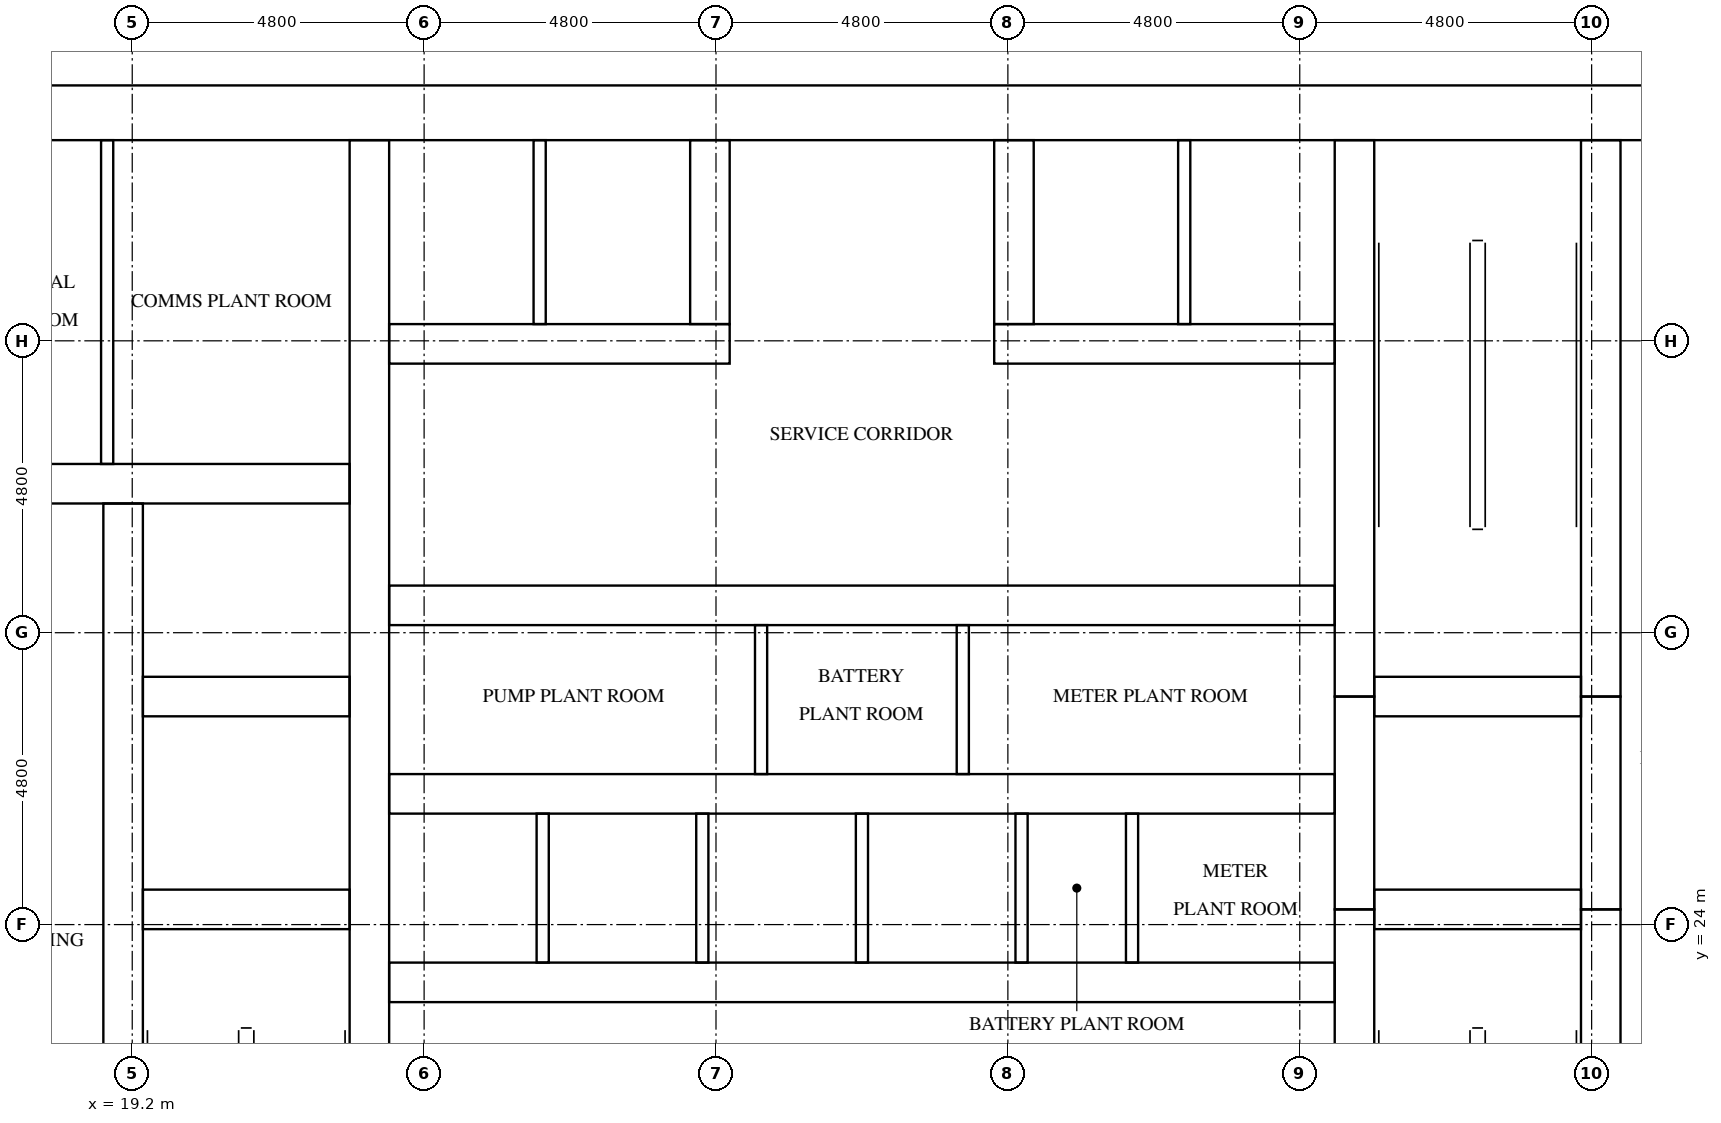
"""IFC4 building model, lengths in metres.
Left out: names, types, materials, properties, quantities, classifications, styles, units other than length and angle.
Written with IfcOpenShell. Run it as: python <this file> out.ifc"""

import sys

from ifc_helpers import new_model, si_unit, direction, frame, frame_2d, origin, place, context, subcontext, project, spatial, rectangle, extrude, element, fill, save


model = new_model("IFC4")
c1 = context("Model", 3, precision=1e-05, world=origin(), true_north=direction((0.0, 1.0)))
c2 = subcontext(c1, "Body", "Model", "MODEL_VIEW")
j1 = project(units=[si_unit("LENGTHUNIT", "METRE"), si_unit("PLANEANGLEUNIT", "RADIAN")], contexts=[c1])
p1 = place(None, origin())
s1 = spatial("IfcSite", under=j1, at=p1, CompositionType="ELEMENT")
p2 = place(p1, origin())
s2 = spatial("IfcBuilding", under=s1, at=p2, CompositionType="ELEMENT")
p3 = place(p2, frame((0.0, 0.0, 53.9)))
s3 = spatial("IfcBuildingStorey", under=s2, at=p3, CompositionType="ELEMENT", Elevation=53.9)
p4 = place(p3, frame((15.0, 37.35, 0.0), z_axis=(0.0, 0.0, 1.0), x_axis=(1.0, 0.0, 0.0)))
e1 = element("IfcWall", 1, at=p4, inside=s3, PredefinedType="SHEAR", context=c2, shape_type="SweptSolid", body=[
    extrude(rectangle(XDim=32.4, YDim=0.9, at=frame_2d((16.2, 0.0))), origin(), (0.0, 0.0, 1.0), 5.1),
])
p5 = place(p4, frame((15.3, 0.0, 0.0)))
e2 = element("IfcOpeningElement", 2, at=p5, cuts=e1, PredefinedType="OPENING", context=c2, shape_type="SweptSolid", body=[
    extrude(rectangle(XDim=1.8, YDim=2.1, at=frame_2d((0.9, 1.05))), frame((0.0, 0.46, 0.0), z_axis=(0.0, -1.0, 0.0), x_axis=(1.0, 0.0, 0.0)), (0.0, 0.0, 1.0), 0.92),
])
p6 = place(p4, frame((1.794, 0.0, 0.0)))
e3 = element("IfcOpeningElement", 3, at=p6, cuts=e1, PredefinedType="OPENING", context=c2, shape_type="SweptSolid", body=[
    extrude(rectangle(XDim=1.0, YDim=2.1, at=frame_2d((0.5, 1.05))), frame((0.0, 0.46, 0.0), z_axis=(0.0, -1.0, 0.0), x_axis=(1.0, 0.0, 0.0)), (0.0, 0.0, 1.0), 0.92),
])
p7 = place(p4, frame((5.331, 0.0, 0.0)))
e4 = element("IfcOpeningElement", 4, at=p7, cuts=e1, PredefinedType="OPENING", context=c2, shape_type="SweptSolid", body=[
    extrude(rectangle(XDim=1.0, YDim=2.1, at=frame_2d((0.5, 1.05))), frame((0.0, 0.46, 0.0), z_axis=(0.0, -1.0, 0.0), x_axis=(1.0, 0.0, 0.0)), (0.0, 0.0, 1.0), 0.92),
])
p8 = place(p3, frame((19.05, 15.9, 0.0), z_axis=(0.0, 0.0, 1.0), x_axis=(0.0, 1.0, 0.0)))
e5 = element("IfcWall", 5, at=p8, inside=s3, PredefinedType="SHEAR", context=c2, shape_type="SweptSolid", body=[
    extrude(rectangle(XDim=15.025, YDim=0.65, at=frame_2d((7.513, 0.0))), origin(), (0.0, 0.0, 1.0), 5.1),
])
p9 = place(p8, frame((9.55, 0.0, 0.0)))
e6 = element("IfcOpeningElement", 6, at=p9, cuts=e5, PredefinedType="OPENING", context=c2, shape_type="SweptSolid", body=[
    extrude(rectangle(XDim=1.1, YDim=2.1, at=frame_2d((0.55, 1.05))), frame((0.0, 0.335, 0.0), z_axis=(0.0, -1.0, 0.0), x_axis=(1.0, 0.0, 0.0)), (0.0, 0.0, 1.0), 0.67),
])
p10 = place(p8, frame((13.05, 0.0, 0.0)))
e7 = element("IfcOpeningElement", 7, at=p10, cuts=e5, PredefinedType="OPENING", context=c2, shape_type="SweptSolid", body=[
    extrude(rectangle(XDim=1.1, YDim=2.1, at=frame_2d((0.55, 1.05))), frame((0.0, 0.335, 0.0), z_axis=(0.0, -1.0, 0.0), x_axis=(1.0, 0.0, 0.0)), (0.0, 0.0, 1.0), 0.67),
])
p11 = place(p8, frame((0.3, 0.0, 0.0)))
e8 = element("IfcOpeningElement", 8, at=p11, cuts=e5, PredefinedType="OPENING", context=c2, shape_type="SweptSolid", body=[
    extrude(rectangle(XDim=1.2, YDim=2.1, at=frame_2d((0.6, 1.05))), frame((0.0, 0.335, 0.0), z_axis=(0.0, -1.0, 0.0), x_axis=(1.0, 0.0, 0.0)), (0.0, 0.0, 1.0), 0.67),
])
p12 = place(p3, frame((23.1, 15.9, 0.0), z_axis=(0.0, 0.0, 1.0), x_axis=(0.0, 1.0, 0.0)))
e9 = element("IfcWall", 9, at=p12, inside=s3, PredefinedType="SHEAR", context=c2, shape_type="SweptSolid", body=[
    extrude(rectangle(XDim=21.0, YDim=0.65, at=frame_2d((10.5, 0.0))), origin(), (0.0, 0.0, 1.0), 5.1),
])
p13 = place(p3, frame((39.3, 15.9, 0.0), z_axis=(0.0, 0.0, 1.0), x_axis=(0.0, 1.0, 0.0)))
e10 = element("IfcWall", 10, at=p13, inside=s3, PredefinedType="SHEAR", context=c2, shape_type="SweptSolid", body=[
    extrude(rectangle(XDim=8.35, YDim=0.65, at=frame_2d((4.175, 0.0))), origin(), (0.0, 0.0, 1.0), 5.1),
])
p14 = place(p3, frame((39.3, 24.25, 0.0), z_axis=(0.0, 0.0, 1.0), x_axis=(0.0, 1.0, 0.0)))
e11 = element("IfcWall", 11, at=p14, inside=s3, PredefinedType="SHEAR", context=c2, shape_type="SweptSolid", body=[
    extrude(rectangle(XDim=3.5, YDim=0.65, at=frame_2d((1.75, 0.0))), origin(), (0.0, 0.0, 1.0), 5.1),
])
p15 = place(p3, frame((39.3, 27.75, 0.0), z_axis=(0.0, 0.0, 1.0), x_axis=(0.0, 1.0, 0.0)))
e12 = element("IfcWall", 12, at=p15, inside=s3, PredefinedType="SHEAR", context=c2, shape_type="SweptSolid", body=[
    extrude(rectangle(XDim=9.15, YDim=0.65, at=frame_2d((4.575, 0.0))), origin(), (0.0, 0.0, 1.0), 5.1),
])
p16 = place(p3, frame((43.35, 15.9, 0.0), z_axis=(0.0, 0.0, 1.0), x_axis=(0.0, 1.0, 0.0)))
e13 = element("IfcWall", 13, at=p16, inside=s3, PredefinedType="SHEAR", context=c2, shape_type="SweptSolid", body=[
    extrude(rectangle(XDim=8.35, YDim=0.65, at=frame_2d((4.175, 0.0))), origin(), (0.0, 0.0, 1.0), 5.1),
])
p17 = place(p16, frame((0.3, 0.0, 0.0)))
e14 = element("IfcOpeningElement", 14, at=p17, cuts=e13, PredefinedType="OPENING", context=c2, shape_type="SweptSolid", body=[
    extrude(rectangle(XDim=1.2, YDim=2.1, at=frame_2d((0.6, 1.05))), frame((0.0, 0.335, 0.0), z_axis=(0.0, -1.0, 0.0), x_axis=(1.0, 0.0, 0.0)), (0.0, 0.0, 1.0), 0.67),
])
p18 = place(p3, frame((43.35, 24.25, 0.0), z_axis=(0.0, 0.0, 1.0), x_axis=(0.0, 1.0, 0.0)))
e15 = element("IfcWall", 15, at=p18, inside=s3, PredefinedType="SHEAR", context=c2, shape_type="SweptSolid", body=[
    extrude(rectangle(XDim=3.5, YDim=0.65, at=frame_2d((1.75, 0.0))), origin(), (0.0, 0.0, 1.0), 5.1),
])
p19 = place(p18, frame((1.2, 0.0, 0.0)))
e16 = element("IfcOpeningElement", 16, at=p19, cuts=e15, PredefinedType="OPENING", context=c2, shape_type="SweptSolid", body=[
    extrude(rectangle(XDim=1.1, YDim=2.1, at=frame_2d((0.55, 1.05))), frame((0.0, 0.335, 0.0), z_axis=(0.0, -1.0, 0.0), x_axis=(1.0, 0.0, 0.0)), (0.0, 0.0, 1.0), 0.67),
])
p20 = place(p3, frame((43.35, 27.75, 0.0), z_axis=(0.0, 0.0, 1.0), x_axis=(0.0, 1.0, 0.0)))
e17 = element("IfcWall", 17, at=p20, inside=s3, PredefinedType="SHEAR", context=c2, shape_type="SweptSolid", body=[
    extrude(rectangle(XDim=9.15, YDim=0.65, at=frame_2d((4.575, 0.0))), origin(), (0.0, 0.0, 1.0), 5.1),
])
p21 = place(p20, frame((7.65, 0.0, 0.0)))
e18 = element("IfcOpeningElement", 18, at=p21, cuts=e17, PredefinedType="OPENING", context=c2, shape_type="SweptSolid", body=[
    extrude(rectangle(XDim=1.2, YDim=2.1, at=frame_2d((0.6, 1.05))), frame((0.0, 0.335, 0.0), z_axis=(0.0, -1.0, 0.0), x_axis=(1.0, 0.0, 0.0)), (0.0, 0.0, 1.0), 0.67),
])
for number, where, z_axis, x_axis in (
    (19, (19.375, 24.25, 0.0), (0.0, 0.0, 1.0), (1.0, 0.0, 0.0)),
    (20, (19.375, 27.75, 0.0), (0.0, 0.0, 1.0), (1.0, 0.0, 0.0)),
):
    element("IfcWall", number, at=place(p3, frame(where, z_axis=z_axis, x_axis=x_axis)), inside=s3, PredefinedType="SHEAR", context=c2, shape_type="SweptSolid", body=[
        extrude(rectangle(XDim=3.4, YDim=0.65, at=frame_2d((1.7, 0.0))), origin(), (0.0, 0.0, 1.0), 5.1),
    ])
p22 = place(p3, frame((15.9, 31.25, 0.0), z_axis=(0.0, 0.0, 1.0), x_axis=(1.0, 0.0, 0.0)))
e21 = element("IfcWall", 21, at=p22, inside=s3, PredefinedType="SHEAR", context=c2, shape_type="SweptSolid", body=[
    extrude(rectangle(XDim=6.875, YDim=0.65, at=frame_2d((3.438, 0.0))), origin(), (0.0, 0.0, 1.0), 5.1),
])
for number, where, z_axis, x_axis in (
    (22, (39.625, 24.25, 0.0), (0.0, 0.0, 1.0), (1.0, 0.0, 0.0)),
    (23, (39.625, 27.75, 0.0), (0.0, 0.0, 1.0), (1.0, 0.0, 0.0)),
):
    element("IfcWall", number, at=place(p3, frame(where, z_axis=z_axis, x_axis=x_axis)), inside=s3, PredefinedType="SHEAR", context=c2, shape_type="SweptSolid", body=[
        extrude(rectangle(XDim=3.4, YDim=0.65, at=frame_2d((1.7, 0.0))), origin(), (0.0, 0.0, 1.0), 5.1),
    ])
p23 = place(p3, frame((23.425, 23.05, 0.0), z_axis=(0.0, 0.0, 1.0), x_axis=(1.0, 0.0, 0.0)))
e24 = element("IfcWall", 24, at=p23, inside=s3, PredefinedType="SHEAR", context=c2, shape_type="SweptSolid", body=[
    extrude(rectangle(XDim=15.55, YDim=0.65, at=frame_2d((7.775, 0.0))), origin(), (0.0, 0.0, 1.0), 5.1),
])
p24 = place(p23, frame((0.663, 0.0, 0.0)))
e25 = element("IfcOpeningElement", 25, at=p24, cuts=e24, PredefinedType="OPENING", context=c2, shape_type="SweptSolid", body=[
    extrude(rectangle(XDim=1.1, YDim=2.1, at=frame_2d((0.55, 1.05))), frame((0.0, 0.335, 0.0), z_axis=(0.0, -1.0, 0.0), x_axis=(1.0, 0.0, 0.0)), (0.0, 0.0, 1.0), 0.67),
])
p25 = place(p23, frame((3.288, 0.0, 0.0)))
e26 = element("IfcOpeningElement", 26, at=p25, cuts=e24, PredefinedType="OPENING", context=c2, shape_type="SweptSolid", body=[
    extrude(rectangle(XDim=1.1, YDim=2.1, at=frame_2d((0.55, 1.05))), frame((0.0, 0.335, 0.0), z_axis=(0.0, -1.0, 0.0), x_axis=(1.0, 0.0, 0.0)), (0.0, 0.0, 1.0), 0.67),
])
p26 = place(p23, frame((10.809, 0.0, 0.0)))
e27 = element("IfcOpeningElement", 27, at=p26, cuts=e24, PredefinedType="OPENING", context=c2, shape_type="SweptSolid", body=[
    extrude(rectangle(XDim=1.0, YDim=2.1, at=frame_2d((0.5, 1.05))), frame((0.0, 0.335, 0.0), z_axis=(0.0, -1.0, 0.0), x_axis=(1.0, 0.0, 0.0)), (0.0, 0.0, 1.0), 0.67),
])
p27 = place(p23, frame((13.434, 0.0, 0.0)))
e28 = element("IfcOpeningElement", 28, at=p27, cuts=e24, PredefinedType="OPENING", context=c2, shape_type="SweptSolid", body=[
    extrude(rectangle(XDim=1.0, YDim=2.1, at=frame_2d((0.5, 1.05))), frame((0.0, 0.335, 0.0), z_axis=(0.0, -1.0, 0.0), x_axis=(1.0, 0.0, 0.0)), (0.0, 0.0, 1.0), 0.67),
])
p28 = place(p3, frame((23.425, 26.15, 0.0), z_axis=(0.0, 0.0, 1.0), x_axis=(1.0, 0.0, 0.0)))
e29 = element("IfcWall", 29, at=p28, inside=s3, PredefinedType="SHEAR", context=c2, shape_type="SweptSolid", body=[
    extrude(rectangle(XDim=15.55, YDim=0.65, at=frame_2d((7.775, 0.0))), origin(), (0.0, 0.0, 1.0), 5.1),
])
p29 = place(p3, frame((23.425, 29.25, 0.0), z_axis=(0.0, 0.0, 1.0), x_axis=(1.0, 0.0, 0.0)))
e30 = element("IfcWall", 30, at=p29, inside=s3, PredefinedType="SHEAR", context=c2, shape_type="SweptSolid", body=[
    extrude(rectangle(XDim=15.55, YDim=0.65, at=frame_2d((7.775, 0.0))), origin(), (0.0, 0.0, 1.0), 5.1),
])
p30 = place(p29, frame((2.508, 0.0, 0.0)))
e31 = element("IfcOpeningElement", 31, at=p30, cuts=e30, PredefinedType="OPENING", context=c2, shape_type="SweptSolid", body=[
    extrude(rectangle(XDim=1.0, YDim=2.1, at=frame_2d((0.5, 1.05))), frame((0.0, 0.335, 0.0), z_axis=(0.0, -1.0, 0.0), x_axis=(1.0, 0.0, 0.0)), (0.0, 0.0, 1.0), 0.67),
])
p31 = place(p29, frame((7.275, 0.0, 0.0)))
e32 = element("IfcOpeningElement", 32, at=p31, cuts=e30, PredefinedType="OPENING", context=c2, shape_type="SweptSolid", body=[
    extrude(rectangle(XDim=1.0, YDim=2.1, at=frame_2d((0.5, 1.05))), frame((0.0, 0.335, 0.0), z_axis=(0.0, -1.0, 0.0), x_axis=(1.0, 0.0, 0.0)), (0.0, 0.0, 1.0), 0.67),
])
p32 = place(p29, frame((12.042, 0.0, 0.0)))
e33 = element("IfcOpeningElement", 33, at=p32, cuts=e30, PredefinedType="OPENING", context=c2, shape_type="SweptSolid", body=[
    extrude(rectangle(XDim=1.0, YDim=2.1, at=frame_2d((0.5, 1.05))), frame((0.0, 0.335, 0.0), z_axis=(0.0, -1.0, 0.0), x_axis=(1.0, 0.0, 0.0)), (0.0, 0.0, 1.0), 0.67),
])
p33 = place(p3, frame((23.425, 33.55, 0.0), z_axis=(0.0, 0.0, 1.0), x_axis=(1.0, 0.0, 0.0)))
e34 = element("IfcWall", 34, at=p33, inside=s3, PredefinedType="SHEAR", context=c2, shape_type="SweptSolid", body=[
    extrude(rectangle(XDim=5.6, YDim=0.65, at=frame_2d((2.8, 0.0))), origin(), (0.0, 0.0, 1.0), 5.1),
])
p34 = place(p3, frame((33.375, 33.55, 0.0), z_axis=(0.0, 0.0, 1.0), x_axis=(1.0, 0.0, 0.0)))
e35 = element("IfcWall", 35, at=p34, inside=s3, PredefinedType="SHEAR", context=c2, shape_type="SweptSolid", body=[
    extrude(rectangle(XDim=5.6, YDim=0.65, at=frame_2d((2.8, 0.0))), origin(), (0.0, 0.0, 1.0), 5.1),
])
for number, where, z_axis, x_axis in (
    (36, (28.7, 33.875, 0.0), (0.0, 0.0, 1.0), (0.0, 1.0, 0.0)),
    (37, (33.7, 33.875, 0.0), (0.0, 0.0, 1.0), (0.0, 1.0, 0.0)),
):
    element("IfcWall", number, at=place(p3, frame(where, z_axis=z_axis, x_axis=x_axis)), inside=s3, PredefinedType="SHEAR", context=c2, shape_type="SweptSolid", body=[
        extrude(rectangle(XDim=3.025, YDim=0.65, at=frame_2d((1.512, 0.0))), origin(), (0.0, 0.0, 1.0), 5.1),
    ])
for number, where, z_axis, x_axis in (
    (38, (25.95, 23.375, 0.0), (0.0, 0.0, 1.0), (0.0, 1.0, 0.0)),
    (39, (28.575, 23.375, 0.0), (0.0, 0.0, 1.0), (0.0, 1.0, 0.0)),
    (40, (31.2, 23.375, 0.0), (0.0, 0.0, 1.0), (0.0, 1.0, 0.0)),
    (41, (33.825, 23.375, 0.0), (0.0, 0.0, 1.0), (0.0, 1.0, 0.0)),
):
    element("IfcWall", number, at=place(p3, frame(where, z_axis=z_axis, x_axis=x_axis)), inside=s3, PredefinedType="SOLIDWALL", context=c2, shape_type="SweptSolid", body=[
        extrude(rectangle(XDim=2.45, YDim=0.2, at=frame_2d((1.225, 0.0))), origin(), (0.0, 0.0, 1.0), 5.1),
    ])
for number, where, z_axis, x_axis in (
    (42, (25.9, 33.875, 0.0), (0.0, 0.0, 1.0), (0.0, 1.0, 0.0)),
    (43, (36.5, 33.875, 0.0), (0.0, 0.0, 1.0), (0.0, 1.0, 0.0)),
):
    element("IfcWall", number, at=place(p3, frame(where, z_axis=z_axis, x_axis=x_axis)), inside=s3, PredefinedType="SOLIDWALL", context=c2, shape_type="SweptSolid", body=[
        extrude(rectangle(XDim=3.025, YDim=0.2, at=frame_2d((1.512, 0.0))), origin(), (0.0, 0.0, 1.0), 5.1),
    ])
p35 = place(p3, frame((18.788, 31.575, 0.0), z_axis=(0.0, 0.0, 1.0), x_axis=(0.0, 1.0, 0.0)))
e44 = element("IfcWall", 44, at=p35, inside=s3, PredefinedType="PARTITIONING", context=c2, shape_type="SweptSolid", body=[
    extrude(rectangle(XDim=5.325, YDim=0.2, at=frame_2d((2.663, 0.0))), origin(), (0.0, 0.0, 1.0), 5.1),
])
for number, where, z_axis, x_axis in (
    (45, (35.642, 23.375, 0.0), (0.0, 0.0, 1.0), (0.0, 1.0, 0.0)),
    (46, (29.541, 26.475, 0.0), (0.0, 0.0, 1.0), (0.0, 1.0, 0.0)),
    (47, (32.859, 26.475, 0.0), (0.0, 0.0, 1.0), (0.0, 1.0, 0.0)),
):
    element("IfcWall", number, at=place(p3, frame(where, z_axis=z_axis, x_axis=x_axis)), inside=s3, PredefinedType="PARTITIONING", context=c2, shape_type="SweptSolid", body=[
        extrude(rectangle(XDim=2.45, YDim=0.2, at=frame_2d((1.225, 0.0))), origin(), (0.0, 0.0, 1.0), 5.1),
    ])
p36 = place(p24, origin())
e48 = element("IfcDoor", 48, at=p36, inside=s3, OperationType="DOUBLE_DOOR_SLIDING", PredefinedType="DOOR", context=c2, shape_type="SweptSolid", body=[
    extrude(rectangle(XDim=1.1, YDim=2.1, at=frame_2d((0.55, 1.05))), frame((0.0, 0.025, 0.0), z_axis=(0.0, -1.0, 0.0), x_axis=(1.0, 0.0, 0.0)), (0.0, 0.0, 1.0), 0.05),
])
fill(e25, e48)
p37 = place(p25, origin())
e49 = element("IfcDoor", 49, at=p37, inside=s3, OperationType="DOUBLE_DOOR_SLIDING", PredefinedType="DOOR", context=c2, shape_type="SweptSolid", body=[
    extrude(rectangle(XDim=1.1, YDim=2.1, at=frame_2d((0.55, 1.05))), frame((0.0, 0.025, 0.0), z_axis=(0.0, -1.0, 0.0), x_axis=(1.0, 0.0, 0.0)), (0.0, 0.0, 1.0), 0.05),
])
fill(e26, e49)
p38 = place(p9, origin())
e50 = element("IfcDoor", 50, at=p38, inside=s3, OperationType="DOUBLE_DOOR_SLIDING", PredefinedType="DOOR", context=c2, shape_type="SweptSolid", body=[
    extrude(rectangle(XDim=1.1, YDim=2.1, at=frame_2d((0.55, 1.05))), frame((0.0, 0.025, 0.0), z_axis=(0.0, -1.0, 0.0), x_axis=(1.0, 0.0, 0.0)), (0.0, 0.0, 1.0), 0.05),
])
fill(e6, e50)
p39 = place(p10, origin())
e51 = element("IfcDoor", 51, at=p39, inside=s3, OperationType="DOUBLE_DOOR_SLIDING", PredefinedType="DOOR", context=c2, shape_type="SweptSolid", body=[
    extrude(rectangle(XDim=1.1, YDim=2.1, at=frame_2d((0.55, 1.05))), frame((0.0, 0.025, 0.0), z_axis=(0.0, -1.0, 0.0), x_axis=(1.0, 0.0, 0.0)), (0.0, 0.0, 1.0), 0.05),
])
fill(e7, e51)
p40 = place(p19, origin())
e52 = element("IfcDoor", 52, at=p40, inside=s3, OperationType="DOUBLE_DOOR_SLIDING", PredefinedType="DOOR", context=c2, shape_type="SweptSolid", body=[
    extrude(rectangle(XDim=1.1, YDim=2.1, at=frame_2d((0.55, 1.05))), frame((0.0, 0.025, 0.0), z_axis=(0.0, -1.0, 0.0), x_axis=(1.0, 0.0, 0.0)), (0.0, 0.0, 1.0), 0.05),
])
fill(e16, e52)
p41 = place(p21, origin())
e53 = element("IfcDoor", 53, at=p41, inside=s3, OperationType="SINGLE_SWING_LEFT", PredefinedType="DOOR", context=c2, shape_type="SweptSolid", body=[
    extrude(rectangle(XDim=1.2, YDim=2.1, at=frame_2d((0.6, 1.05))), frame((0.0, 0.025, 0.0), z_axis=(0.0, -1.0, 0.0), x_axis=(1.0, 0.0, 0.0)), (0.0, 0.0, 1.0), 0.05),
])
fill(e18, e53)
p42 = place(p5, origin())
e54 = element("IfcDoor", 54, at=p42, inside=s3, OperationType="DOUBLE_DOOR_SINGLE_SWING", PredefinedType="DOOR", context=c2, shape_type="SweptSolid", body=[
    extrude(rectangle(XDim=1.8, YDim=2.1, at=frame_2d((0.9, 1.05))), frame((0.0, 0.025, 0.0), z_axis=(0.0, -1.0, 0.0), x_axis=(1.0, 0.0, 0.0)), (0.0, 0.0, 1.0), 0.05),
])
fill(e2, e54)
p43 = place(p7, origin())
e55 = element("IfcDoor", 55, at=p43, inside=s3, OperationType="SINGLE_SWING_LEFT", PredefinedType="DOOR", context=c2, shape_type="SweptSolid", body=[
    extrude(rectangle(XDim=1.0, YDim=2.1, at=frame_2d((0.5, 1.05))), frame((0.0, 0.025, 0.0), z_axis=(0.0, -1.0, 0.0), x_axis=(1.0, 0.0, 0.0)), (0.0, 0.0, 1.0), 0.05),
])
fill(e4, e55)
p44 = place(p26, frame((1.0, 0.0, 0.0), z_axis=(0.0, 0.0, 1.0), x_axis=(-1.0, 0.0, 0.0)))
e56 = element("IfcDoor", 56, at=p44, inside=s3, OperationType="SINGLE_SWING_RIGHT", PredefinedType="DOOR", context=c2, shape_type="SweptSolid", body=[
    extrude(rectangle(XDim=1.0, YDim=2.1, at=frame_2d((0.5, 1.05))), frame((0.0, 0.025, 0.0), z_axis=(0.0, -1.0, 0.0), x_axis=(1.0, 0.0, 0.0)), (0.0, 0.0, 1.0), 0.05),
])
fill(e27, e56)
p45 = place(p27, frame((1.0, 0.0, 0.0), z_axis=(0.0, 0.0, 1.0), x_axis=(-1.0, 0.0, 0.0)))
e57 = element("IfcDoor", 57, at=p45, inside=s3, OperationType="SINGLE_SWING_LEFT", PredefinedType="DOOR", context=c2, shape_type="SweptSolid", body=[
    extrude(rectangle(XDim=1.0, YDim=2.1, at=frame_2d((0.5, 1.05))), frame((0.0, 0.025, 0.0), z_axis=(0.0, -1.0, 0.0), x_axis=(1.0, 0.0, 0.0)), (0.0, 0.0, 1.0), 0.05),
])
fill(e28, e57)
p46 = place(p30, origin())
e58 = element("IfcDoor", 58, at=p46, inside=s3, OperationType="SINGLE_SWING_RIGHT", PredefinedType="DOOR", context=c2, shape_type="SweptSolid", body=[
    extrude(rectangle(XDim=1.0, YDim=2.1, at=frame_2d((0.5, 1.05))), frame((0.0, 0.025, 0.0), z_axis=(0.0, -1.0, 0.0), x_axis=(1.0, 0.0, 0.0)), (0.0, 0.0, 1.0), 0.05),
])
fill(e31, e58)
p47 = place(p31, origin())
e59 = element("IfcDoor", 59, at=p47, inside=s3, OperationType="SINGLE_SWING_LEFT", PredefinedType="DOOR", context=c2, shape_type="SweptSolid", body=[
    extrude(rectangle(XDim=1.0, YDim=2.1, at=frame_2d((0.5, 1.05))), frame((0.0, 0.025, 0.0), z_axis=(0.0, -1.0, 0.0), x_axis=(1.0, 0.0, 0.0)), (0.0, 0.0, 1.0), 0.05),
])
fill(e32, e59)
p48 = place(p32, origin())
e60 = element("IfcDoor", 60, at=p48, inside=s3, OperationType="SINGLE_SWING_RIGHT", PredefinedType="DOOR", context=c2, shape_type="SweptSolid", body=[
    extrude(rectangle(XDim=1.0, YDim=2.1, at=frame_2d((0.5, 1.05))), frame((0.0, 0.025, 0.0), z_axis=(0.0, -1.0, 0.0), x_axis=(1.0, 0.0, 0.0)), (0.0, 0.0, 1.0), 0.05),
])
fill(e33, e60)
save(model, sys.argv[1])
